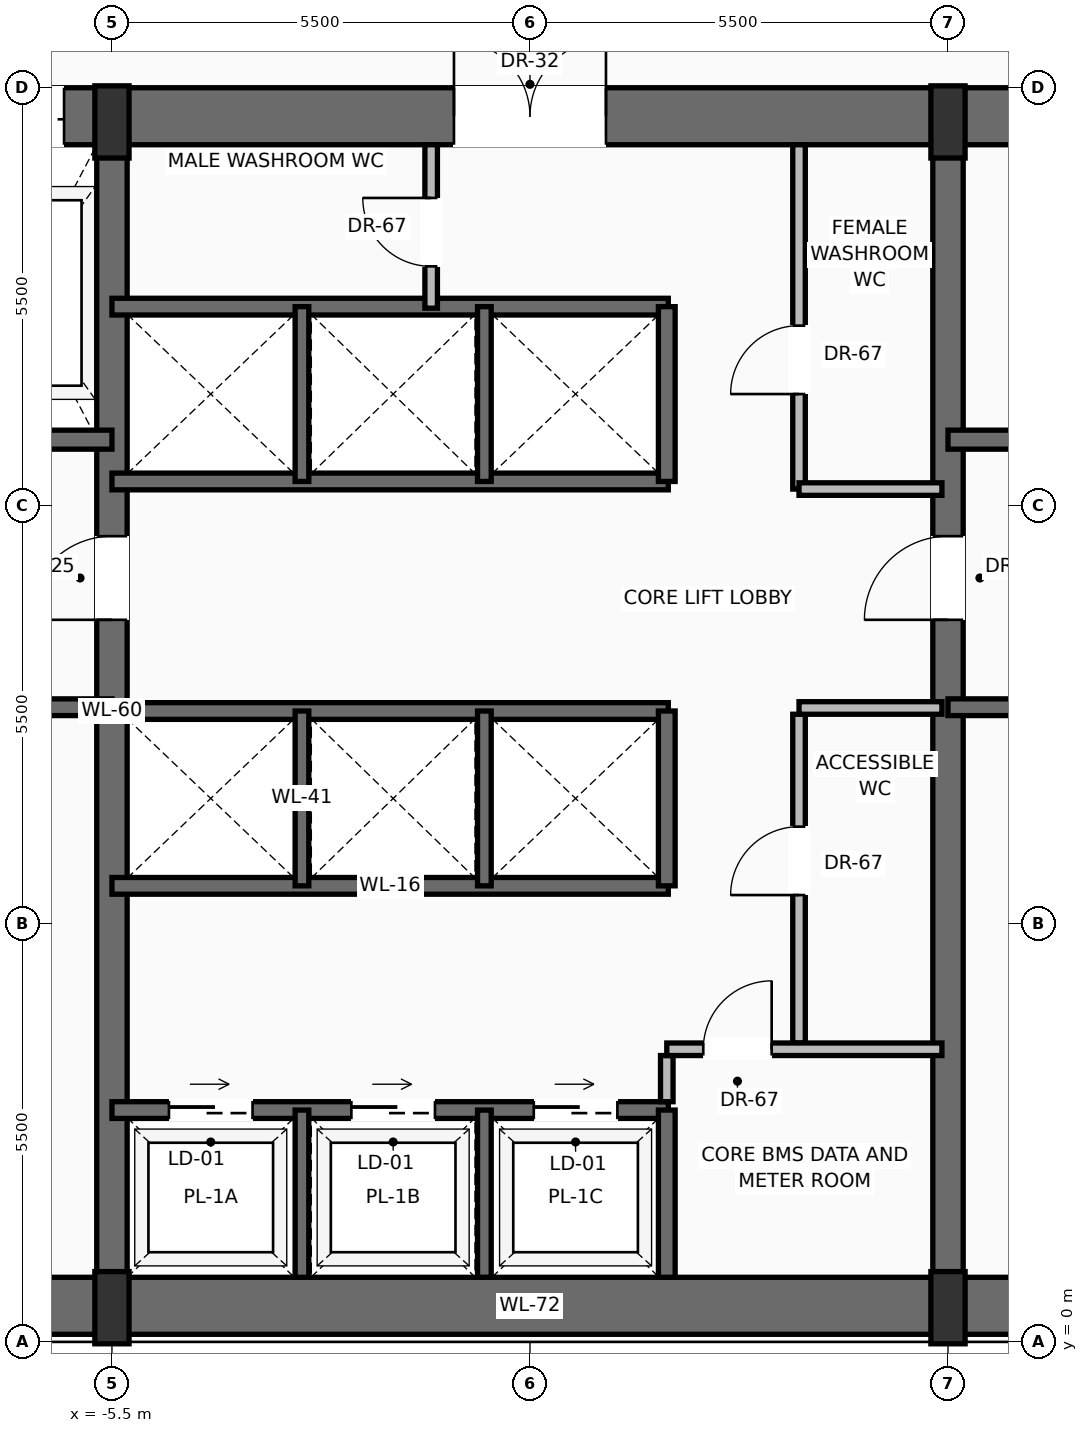
"""IFC4 building model, lengths in metres.
Left out: names, types, materials, properties, quantities, classifications, styles, units other than length and angle.
Written with IfcOpenShell. Run it as: python <this file> out.ifc"""

import sys

from ifc_helpers import new_model, si_unit, direction, frame, frame_2d, origin, origin_2d, place, context, subcontext, project, spatial, rectangle, extrude, source, transform, mapped, element, fill, save


model = new_model("IFC4")
c1 = context("Model", 3, precision=1e-05, world=origin(), true_north=direction((0.0, 1.0)))
c2 = subcontext(c1, "Body", "Model", "MODEL_VIEW")
j1 = project(units=[si_unit("LENGTHUNIT", "METRE"), si_unit("PLANEANGLEUNIT", "RADIAN")], contexts=[c1])
p1 = place(None, origin())
s1 = spatial("IfcSite", under=j1, at=p1, CompositionType="ELEMENT")
p2 = place(p1, origin())
s2 = spatial("IfcBuilding", under=s1, at=p2, CompositionType="ELEMENT")
p3 = place(p2, frame((0.0, 0.0, 102.5)))
s3 = spatial("IfcBuildingStorey", under=s2, at=p3, CompositionType="ELEMENT", Elevation=102.5)
p4 = place(p3, frame((-10.65, 0.475, 0.0), z_axis=(0.0, 0.0, 1.0), x_axis=(1.0, 0.0, 0.0)))
e1 = element("IfcWall", 1, at=p4, inside=s3, PredefinedType="SHEAR", context=c2, shape_type="SweptSolid", body=[
    extrude(rectangle(XDim=21.3, YDim=0.75, at=frame_2d((10.65, 0.0))), origin(), (0.0, 0.0, 1.0), 3.45),
])
p5 = place(p3, frame((-10.9, 16.125, 0.0), z_axis=(0.0, 0.0, 1.0), x_axis=(1.0, 0.0, 0.0)))
e2 = element("IfcWall", 2, at=p5, inside=s3, PredefinedType="SHEAR", context=c2, shape_type="SweptSolid", body=[
    extrude(rectangle(XDim=21.8, YDim=0.75, at=frame_2d((10.9, 0.0))), origin(), (0.0, 0.0, 1.0), 3.45),
])
p6 = place(p5, frame((3.47, 0.0, 0.0)))
e3 = element("IfcOpeningElement", 3, at=p6, cuts=e2, PredefinedType="OPENING", context=c2, shape_type="SweptSolid", body=[
    extrude(rectangle(XDim=1.3, YDim=2.3, at=frame_2d((0.65, 1.15))), frame((0.0, 0.385, 0.0), z_axis=(0.0, -1.0, 0.0), x_axis=(1.0, 0.0, 0.0)), (0.0, 0.0, 1.0), 0.77),
])
p7 = place(p5, frame((9.9, 0.0, 0.0)))
e4 = element("IfcOpeningElement", 4, at=p7, cuts=e2, PredefinedType="OPENING", context=c2, shape_type="SweptSolid", body=[
    extrude(rectangle(XDim=2.0, YDim=2.4, at=frame_2d((1.0, 1.2))), frame((0.0, 0.385, 0.0), z_axis=(0.0, -1.0, 0.0), x_axis=(1.0, 0.0, 0.0)), (0.0, 0.0, 1.0), 0.77),
])
p8 = place(p3, frame((-5.5, 0.475, 0.0), z_axis=(0.0, 0.0, 1.0), x_axis=(0.0, 1.0, 0.0)))
e5 = element("IfcWall", 5, at=p8, inside=s3, PredefinedType="SHEAR", context=c2, shape_type="SweptSolid", body=[
    extrude(rectangle(XDim=15.65, YDim=0.4, at=frame_2d((7.825, 0.0))), origin(), (0.0, 0.0, 1.0), 3.45),
])
p9 = place(p8, frame((9.025, 0.0, 0.0)))
e6 = element("IfcOpeningElement", 6, at=p9, cuts=e5, PredefinedType="OPENING", context=c2, shape_type="SweptSolid", body=[
    extrude(rectangle(XDim=1.1, YDim=2.2, at=frame_2d((0.55, 1.1))), frame((0.0, 0.21, 0.0), z_axis=(0.0, -1.0, 0.0), x_axis=(1.0, 0.0, 0.0)), (0.0, 0.0, 1.0), 0.42),
])
p10 = place(p3, frame((5.5, 0.475, 0.0), z_axis=(0.0, 0.0, 1.0), x_axis=(0.0, 1.0, 0.0)))
e7 = element("IfcWall", 7, at=p10, inside=s3, PredefinedType="SHEAR", context=c2, shape_type="SweptSolid", body=[
    extrude(rectangle(XDim=15.65, YDim=0.4, at=frame_2d((7.825, 0.0))), origin(), (0.0, 0.0, 1.0), 3.45),
])
p11 = place(p10, frame((9.025, 0.0, 0.0)))
e8 = element("IfcOpeningElement", 8, at=p11, cuts=e7, PredefinedType="OPENING", context=c2, shape_type="SweptSolid", body=[
    extrude(rectangle(XDim=1.1, YDim=2.2, at=frame_2d((0.55, 1.1))), frame((0.0, 0.21, 0.0), z_axis=(0.0, -1.0, 0.0), x_axis=(1.0, 0.0, 0.0)), (0.0, 0.0, 1.0), 0.42),
])
m1 = source(origin(), c2, "Body", "SweptSolid", [
    extrude(rectangle(XDim=0.45, YDim=0.95, at=origin_2d()), origin(), (0.0, 0.0, 1.0), 3.7),
])
for number, where, z_axis, x_axis in (
    (9, (-5.5, 0.45, 0.0), (0.0, 0.0, 1.0), (1.0, 0.0, 0.0)),
    (10, (5.5, 0.45, 0.0), (0.0, 0.0, 1.0), (1.0, 0.0, 0.0)),
    (11, (-5.5, 16.05, 0.0), (0.0, 0.0, 1.0), (1.0, 0.0, 0.0)),
    (12, (5.5, 16.05, 0.0), (0.0, 0.0, 1.0), (1.0, 0.0, 0.0)),
):
    element("IfcColumn", number, at=place(p3, frame(where, z_axis=z_axis, x_axis=x_axis)), inside=s3, PredefinedType="PILASTER", context=c2, shape_type="MappedRepresentation", body=[
        mapped(m1, transform((0.0, 0.0, 0.0), scale=1.0)),
    ])
p12 = place(p3, frame((-5.5, 8.35, 0.0), z_axis=(0.0, 0.0, 1.0), x_axis=(-1.0, 0.0, 0.0)))
e13 = element("IfcWall", 13, at=p12, inside=s3, PredefinedType="SOLIDWALL", context=c2, shape_type="SweptSolid", body=[
    extrude(rectangle(XDim=4.65, YDim=0.22, at=frame_2d((2.325, 0.0))), origin(), (0.0, 0.0, 1.0), 3.45),
])
p13 = place(p12, frame((2.5, 0.0, 0.0)))
e14 = element("IfcOpeningElement", 14, at=p13, cuts=e13, PredefinedType="OPENING", context=c2, shape_type="SweptSolid", body=[
    extrude(rectangle(XDim=1.15, YDim=2.2, at=frame_2d((0.575, 1.1))), frame((0.0, 0.12, 0.0), z_axis=(0.0, -1.0, 0.0), x_axis=(1.0, 0.0, 0.0)), (0.0, 0.0, 1.0), 0.24),
])
p14 = place(p3, frame((-5.5, 11.87, 0.0), z_axis=(0.0, 0.0, 1.0), x_axis=(-1.0, 0.0, 0.0)))
e15 = element("IfcWall", 15, at=p14, inside=s3, PredefinedType="SOLIDWALL", context=c2, shape_type="SweptSolid", body=[
    extrude(rectangle(XDim=4.65, YDim=0.25, at=frame_2d((2.325, 0.0))), origin(), (0.0, 0.0, 1.0), 3.45),
])
p15 = place(p14, frame((2.95, 0.0, 0.0)))
e16 = element("IfcOpeningElement", 16, at=p15, cuts=e15, PredefinedType="OPENING", context=c2, shape_type="SweptSolid", body=[
    extrude(rectangle(XDim=1.2, YDim=2.25, at=frame_2d((0.6, 1.125))), frame((0.0, 0.135, 0.0), z_axis=(0.0, -1.0, 0.0), x_axis=(1.0, 0.0, 0.0)), (0.0, 0.0, 1.0), 0.27),
])
p16 = place(p3, frame((10.15, 8.35, 0.0), z_axis=(0.0, 0.0, 1.0), x_axis=(-1.0, 0.0, 0.0)))
e17 = element("IfcWall", 17, at=p16, inside=s3, PredefinedType="SOLIDWALL", context=c2, shape_type="SweptSolid", body=[
    extrude(rectangle(XDim=4.65, YDim=0.22, at=frame_2d((2.325, 0.0))), origin(), (0.0, 0.0, 1.0), 3.45),
])
p17 = place(p16, frame((1.0, 0.0, 0.0)))
e18 = element("IfcOpeningElement", 18, at=p17, cuts=e17, PredefinedType="OPENING", context=c2, shape_type="SweptSolid", body=[
    extrude(rectangle(XDim=1.15, YDim=2.2, at=frame_2d((0.575, 1.1))), frame((0.0, 0.12, 0.0), z_axis=(0.0, -1.0, 0.0), x_axis=(1.0, 0.0, 0.0)), (0.0, 0.0, 1.0), 0.24),
])
p18 = place(p3, frame((10.15, 11.87, 0.0), z_axis=(0.0, 0.0, 1.0), x_axis=(-1.0, 0.0, 0.0)))
e19 = element("IfcWall", 19, at=p18, inside=s3, PredefinedType="SOLIDWALL", context=c2, shape_type="SweptSolid", body=[
    extrude(rectangle(XDim=4.65, YDim=0.25, at=frame_2d((2.325, 0.0))), origin(), (0.0, 0.0, 1.0), 3.45),
])
p19 = place(p18, frame((0.5, 0.0, 0.0)))
e20 = element("IfcOpeningElement", 20, at=p19, cuts=e19, PredefinedType="OPENING", context=c2, shape_type="SweptSolid", body=[
    extrude(rectangle(XDim=1.2, YDim=2.25, at=frame_2d((0.6, 1.125))), frame((0.0, 0.135, 0.0), z_axis=(0.0, -1.0, 0.0), x_axis=(1.0, 0.0, 0.0)), (0.0, 0.0, 1.0), 0.27),
])
p20 = place(p3, frame((-5.5, 3.05, 0.0), z_axis=(0.0, 0.0, 1.0), x_axis=(1.0, 0.0, 0.0)))
e21 = element("IfcWall", 21, at=p20, inside=s3, PredefinedType="SOLIDWALL", context=c2, shape_type="SweptSolid", body=[
    extrude(rectangle(XDim=7.32, YDim=0.22, at=frame_2d((3.66, 0.0))), origin(), (0.0, 0.0, 1.0), 3.45),
])
p21 = place(p20, frame((0.75, 0.0, 0.0)))
e22 = element("IfcOpeningElement", 22, at=p21, cuts=e21, PredefinedType="OPENING", context=c2, shape_type="SweptSolid", body=[
    extrude(rectangle(XDim=1.1, YDim=2.2, at=frame_2d((0.55, 1.1))), frame((0.0, 0.12, 0.0), z_axis=(0.0, -1.0, 0.0), x_axis=(1.0, 0.0, 0.0)), (0.0, 0.0, 1.0), 0.24),
])
p22 = place(p20, frame((3.15, 0.0, 0.0)))
e23 = element("IfcOpeningElement", 23, at=p22, cuts=e21, PredefinedType="OPENING", context=c2, shape_type="SweptSolid", body=[
    extrude(rectangle(XDim=1.1, YDim=2.2, at=frame_2d((0.55, 1.1))), frame((0.0, 0.12, 0.0), z_axis=(0.0, -1.0, 0.0), x_axis=(1.0, 0.0, 0.0)), (0.0, 0.0, 1.0), 0.24),
])
p23 = place(p20, frame((5.55, 0.0, 0.0)))
e24 = element("IfcOpeningElement", 24, at=p23, cuts=e21, PredefinedType="OPENING", context=c2, shape_type="SweptSolid", body=[
    extrude(rectangle(XDim=1.1, YDim=2.2, at=frame_2d((0.55, 1.1))), frame((0.0, 0.12, 0.0), z_axis=(0.0, -1.0, 0.0), x_axis=(1.0, 0.0, 0.0)), (0.0, 0.0, 1.0), 0.24),
])
p24 = place(p3, frame((1.8, 0.85, 0.0), z_axis=(0.0, 0.0, 1.0), x_axis=(0.0, 1.0, 0.0)))
e25 = element("IfcWall", 25, at=p24, inside=s3, PredefinedType="SOLIDWALL", context=c2, shape_type="SweptSolid", body=[
    extrude(rectangle(XDim=2.2, YDim=0.22, at=frame_2d((1.1, 0.0))), origin(), (0.0, 0.0, 1.0), 3.45),
])
for number, where, z_axis, x_axis in (
    (26, (-3.0, 0.85, 0.0), (0.0, 0.0, 1.0), (0.0, 1.0, 0.0)),
    (27, (-0.6, 0.85, 0.0), (0.0, 0.0, 1.0), (0.0, 1.0, 0.0)),
):
    element("IfcWall", number, at=place(p3, frame(where, z_axis=z_axis, x_axis=x_axis)), inside=s3, PredefinedType="SOLIDWALL", context=c2, shape_type="SweptSolid", body=[
        extrude(rectangle(XDim=2.2, YDim=0.18, at=frame_2d((1.1, 0.0))), origin(), (0.0, 0.0, 1.0), 3.45),
    ])
p25 = place(p3, frame((1.8, 3.16, 0.0), z_axis=(0.0, 0.0, 1.0), x_axis=(0.0, 1.0, 0.0)))
e28 = element("IfcWall", 28, at=p25, inside=s3, PredefinedType="PARTITIONING", context=c2, shape_type="SweptSolid", body=[
    extrude(rectangle(XDim=0.608, YDim=0.165, at=frame_2d((0.304, 0.0))), origin(), (0.0, 0.0, 1.0), 3.442),
])
p26 = place(p3, frame((3.54, 3.933, 0.0), z_axis=(0.0, 0.0, 1.0), x_axis=(0.0, 1.0, 0.0)))
e29 = element("IfcWall", 29, at=p26, inside=s3, PredefinedType="PARTITIONING", context=c2, shape_type="SweptSolid", body=[
    extrude(rectangle(XDim=4.325, YDim=0.165, at=frame_2d((2.163, 0.0))), origin(), (0.0, 0.0, 1.0), 3.442),
])
p27 = place(p26, frame((1.946, 0.0, 0.0)))
e30 = element("IfcOpeningElement", 30, at=p27, cuts=e29, PredefinedType="OPENING", context=c2, shape_type="SweptSolid", body=[
    extrude(rectangle(XDim=0.9, YDim=2.1, at=frame_2d((0.45, 1.05))), frame((0.0, 0.093, 0.0), z_axis=(0.0, -1.0, 0.0), x_axis=(1.0, 0.0, 0.0)), (0.0, 0.0, 1.0), 0.185),
])
p28 = place(p3, frame((3.54, 8.34, 0.0), z_axis=(0.0, 0.0, 1.0), x_axis=(1.0, 0.0, 0.0)))
e31 = element("IfcWall", 31, at=p28, inside=s3, PredefinedType="PARTITIONING", context=c2, shape_type="SweptSolid", body=[
    extrude(rectangle(XDim=1.88, YDim=0.165, at=frame_2d((0.94, 0.0))), origin(), (0.0, 0.0, 1.0), 3.442),
])
p29 = place(p3, frame((1.8, 3.85, 0.0), z_axis=(0.0, 0.0, 1.0), x_axis=(1.0, 0.0, 0.0)))
e32 = element("IfcWall", 32, at=p29, inside=s3, PredefinedType="PARTITIONING", context=c2, shape_type="SweptSolid", body=[
    extrude(rectangle(XDim=3.62, YDim=0.165, at=frame_2d((1.81, 0.0))), origin(), (0.0, 0.0, 1.0), 3.442),
])
p30 = place(p29, frame((0.48, 0.0, 0.0)))
e33 = element("IfcOpeningElement", 33, at=p30, cuts=e32, PredefinedType="OPENING", context=c2, shape_type="SweptSolid", body=[
    extrude(rectangle(XDim=0.9, YDim=2.1, at=frame_2d((0.45, 1.05))), frame((0.0, 0.093, 0.0), z_axis=(0.0, -1.0, 0.0), x_axis=(1.0, 0.0, 0.0)), (0.0, 0.0, 1.0), 0.185),
])
for number, where, z_axis, x_axis in (
    (34, (-5.5, 6.0, 0.0), (0.0, 0.0, 1.0), (1.0, 0.0, 0.0)),
    (35, (-5.5, 8.3, 0.0), (0.0, 0.0, 1.0), (1.0, 0.0, 0.0)),
):
    element("IfcWall", number, at=place(p3, frame(where, z_axis=z_axis, x_axis=x_axis)), inside=s3, PredefinedType="SOLIDWALL", context=c2, shape_type="SweptSolid", body=[
        extrude(rectangle(XDim=7.32, YDim=0.22, at=frame_2d((3.66, 0.0))), origin(), (0.0, 0.0, 1.0), 3.45),
    ])
p31 = place(p3, frame((1.8, 6.0, 0.0), z_axis=(0.0, 0.0, 1.0), x_axis=(0.0, 1.0, 0.0)))
e36 = element("IfcWall", 36, at=p31, inside=s3, PredefinedType="SOLIDWALL", context=c2, shape_type="SweptSolid", body=[
    extrude(rectangle(XDim=2.3, YDim=0.22, at=frame_2d((1.15, 0.0))), origin(), (0.0, 0.0, 1.0), 3.45),
])
for number, where, z_axis, x_axis in (
    (37, (-3.0, 6.0, 0.0), (0.0, 0.0, 1.0), (0.0, 1.0, 0.0)),
    (38, (-0.6, 6.0, 0.0), (0.0, 0.0, 1.0), (0.0, 1.0, 0.0)),
):
    element("IfcWall", number, at=place(p3, frame(where, z_axis=z_axis, x_axis=x_axis)), inside=s3, PredefinedType="SOLIDWALL", context=c2, shape_type="SweptSolid", body=[
        extrude(rectangle(XDim=2.3, YDim=0.18, at=frame_2d((1.15, 0.0))), origin(), (0.0, 0.0, 1.0), 3.45),
    ])
for number, where, z_axis, x_axis in (
    (39, (-5.5, 11.32, 0.0), (0.0, 0.0, 1.0), (1.0, 0.0, 0.0)),
    (40, (-5.5, 13.62, 0.0), (0.0, 0.0, 1.0), (1.0, 0.0, 0.0)),
):
    element("IfcWall", number, at=place(p3, frame(where, z_axis=z_axis, x_axis=x_axis)), inside=s3, PredefinedType="SOLIDWALL", context=c2, shape_type="SweptSolid", body=[
        extrude(rectangle(XDim=7.32, YDim=0.22, at=frame_2d((3.66, 0.0))), origin(), (0.0, 0.0, 1.0), 3.45),
    ])
p32 = place(p3, frame((1.8, 11.32, 0.0), z_axis=(0.0, 0.0, 1.0), x_axis=(0.0, 1.0, 0.0)))
e41 = element("IfcWall", 41, at=p32, inside=s3, PredefinedType="SOLIDWALL", context=c2, shape_type="SweptSolid", body=[
    extrude(rectangle(XDim=2.3, YDim=0.22, at=frame_2d((1.15, 0.0))), origin(), (0.0, 0.0, 1.0), 3.45),
])
for number, where, z_axis, x_axis in (
    (42, (-3.0, 11.32, 0.0), (0.0, 0.0, 1.0), (0.0, 1.0, 0.0)),
    (43, (-0.6, 11.32, 0.0), (0.0, 0.0, 1.0), (0.0, 1.0, 0.0)),
):
    element("IfcWall", number, at=place(p3, frame(where, z_axis=z_axis, x_axis=x_axis)), inside=s3, PredefinedType="SOLIDWALL", context=c2, shape_type="SweptSolid", body=[
        extrude(rectangle(XDim=2.3, YDim=0.18, at=frame_2d((1.15, 0.0))), origin(), (0.0, 0.0, 1.0), 3.45),
    ])
p33 = place(p3, frame((-1.3, 13.6, 0.0), z_axis=(0.0, 0.0, 1.0), x_axis=(0.0, 1.0, 0.0)))
e44 = element("IfcWall", 44, at=p33, inside=s3, PredefinedType="PARTITIONING", context=c2, shape_type="SweptSolid", body=[
    extrude(rectangle(XDim=2.15, YDim=0.165, at=frame_2d((1.075, 0.0))), origin(), (0.0, 0.0, 1.0), 3.442),
])
p34 = place(p33, frame((0.55, 0.0, 0.0)))
e45 = element("IfcOpeningElement", 45, at=p34, cuts=e44, PredefinedType="OPENING", context=c2, shape_type="SweptSolid", body=[
    extrude(rectangle(XDim=0.9, YDim=2.1, at=frame_2d((0.45, 1.05))), frame((0.0, 0.093, 0.0), z_axis=(0.0, -1.0, 0.0), x_axis=(1.0, 0.0, 0.0)), (0.0, 0.0, 1.0), 0.185),
])
p35 = place(p3, frame((3.54, 11.22, 0.0), z_axis=(0.0, 0.0, 1.0), x_axis=(0.0, 1.0, 0.0)))
e46 = element("IfcWall", 46, at=p35, inside=s3, PredefinedType="PARTITIONING", context=c2, shape_type="SweptSolid", body=[
    extrude(rectangle(XDim=4.53, YDim=0.165, at=frame_2d((2.265, 0.0))), origin(), (0.0, 0.0, 1.0), 3.442),
])
p36 = place(p35, frame((1.25, 0.0, 0.0)))
e47 = element("IfcOpeningElement", 47, at=p36, cuts=e46, PredefinedType="OPENING", context=c2, shape_type="SweptSolid", body=[
    extrude(rectangle(XDim=0.9, YDim=2.1, at=frame_2d((0.45, 1.05))), frame((0.0, 0.093, 0.0), z_axis=(0.0, -1.0, 0.0), x_axis=(1.0, 0.0, 0.0)), (0.0, 0.0, 1.0), 0.185),
])
p37 = place(p3, frame((3.54, 11.22, 0.0), z_axis=(0.0, 0.0, 1.0), x_axis=(1.0, 0.0, 0.0)))
e48 = element("IfcWall", 48, at=p37, inside=s3, PredefinedType="PARTITIONING", context=c2, shape_type="SweptSolid", body=[
    extrude(rectangle(XDim=1.88, YDim=0.165, at=frame_2d((0.94, 0.0))), origin(), (0.0, 0.0, 1.0), 3.442),
])
m2 = source(origin(), c2, "Body", "SweptSolid", [
    extrude(rectangle(XDim=1.1, YDim=2.2, at=frame_2d((0.55, 1.1))), frame((0.0, 0.025, 0.0), z_axis=(0.0, -1.0, 0.0), x_axis=(1.0, 0.0, 0.0)), (0.0, 0.0, 1.0), 0.05),
])
p38 = place(p9, origin())
e49 = element("IfcDoor", 49, at=p38, inside=s3, OperationType="SINGLE_SWING_LEFT", PredefinedType="DOOR", context=c2, shape_type="MappedRepresentation", body=[
    mapped(m2, transform((0.0, 0.0, 0.0), scale=1.0)),
])
fill(e6, e49)
m3 = source(origin(), c2, "Body", "SweptSolid", [
    extrude(rectangle(XDim=1.3, YDim=2.3, at=frame_2d((0.65, 1.15))), frame((0.0, 0.025, 0.0), z_axis=(0.0, -1.0, 0.0), x_axis=(1.0, 0.0, 0.0)), (0.0, 0.0, 1.0), 0.05),
])
p39 = place(p6, origin())
e50 = element("IfcDoor", 50, at=p39, inside=s3, OperationType="SLIDING_TO_RIGHT", PredefinedType="DOOR", context=c2, shape_type="MappedRepresentation", body=[
    mapped(m3, transform((0.0, 0.0, 0.0), scale=1.0)),
])
fill(e3, e50)
p40 = place(p11, origin())
e51 = element("IfcDoor", 51, at=p40, inside=s3, OperationType="SINGLE_SWING_LEFT", PredefinedType="DOOR", context=c2, shape_type="MappedRepresentation", body=[
    mapped(m2, transform((0.0, 0.0, 0.0), scale=1.0)),
])
fill(e8, e51)
m4 = source(origin(), c2, "Body", "SweptSolid", [
    extrude(rectangle(XDim=2.0, YDim=2.4, at=frame_2d((1.0, 1.2))), frame((0.0, 0.025, 0.0), z_axis=(0.0, -1.0, 0.0), x_axis=(1.0, 0.0, 0.0)), (0.0, 0.0, 1.0), 0.05),
])
p41 = place(p7, origin())
e52 = element("IfcDoor", 52, at=p41, inside=s3, OperationType="DOUBLE_DOOR_SINGLE_SWING", PredefinedType="DOOR", context=c2, shape_type="MappedRepresentation", body=[
    mapped(m4, transform((0.0, 0.0, 0.0), scale=1.0)),
])
fill(e4, e52)
m5 = source(origin(), c2, "Body", "SweptSolid", [
    extrude(rectangle(XDim=1.1, YDim=2.2, at=frame_2d((0.55, 1.1))), frame((0.0, 0.025, 0.0), z_axis=(0.0, -1.0, 0.0), x_axis=(1.0, 0.0, 0.0)), (0.0, 0.0, 1.0), 0.05),
])
p42 = place(p21, origin())
e53 = element("IfcDoor", 53, at=p42, inside=s3, OperationType="SLIDING_TO_RIGHT", PredefinedType="DOOR", context=c2, shape_type="MappedRepresentation", body=[
    mapped(m5, transform((0.0, 0.0, 0.0), scale=1.0)),
])
fill(e22, e53)
p43 = place(p22, origin())
e54 = element("IfcDoor", 54, at=p43, inside=s3, OperationType="SLIDING_TO_RIGHT", PredefinedType="DOOR", context=c2, shape_type="MappedRepresentation", body=[
    mapped(m5, transform((0.0, 0.0, 0.0), scale=1.0)),
])
fill(e23, e54)
p44 = place(p23, origin())
e55 = element("IfcDoor", 55, at=p44, inside=s3, OperationType="SLIDING_TO_RIGHT", PredefinedType="DOOR", context=c2, shape_type="MappedRepresentation", body=[
    mapped(m5, transform((0.0, 0.0, 0.0), scale=1.0)),
])
fill(e24, e55)
m6 = source(origin(), c2, "Body", "SweptSolid", [
    extrude(rectangle(XDim=0.9, YDim=2.1, at=frame_2d((0.45, 1.05))), frame((0.0, 0.025, 0.0), z_axis=(0.0, -1.0, 0.0), x_axis=(1.0, 0.0, 0.0)), (0.0, 0.0, 1.0), 0.05),
])
p45 = place(p30, origin())
e56 = element("IfcDoor", 56, at=p45, inside=s3, OperationType="SINGLE_SWING_RIGHT", PredefinedType="DOOR", context=c2, shape_type="MappedRepresentation", body=[
    mapped(m6, transform((0.0, 0.0, 0.0), scale=1.0)),
])
fill(e33, e56)
p46 = place(p27, origin())
e57 = element("IfcDoor", 57, at=p46, inside=s3, OperationType="SINGLE_SWING_LEFT", PredefinedType="DOOR", context=c2, shape_type="MappedRepresentation", body=[
    mapped(m6, transform((0.0, 0.0, 0.0), scale=1.0)),
])
fill(e30, e57)
p47 = place(p34, origin())
e58 = element("IfcDoor", 58, at=p47, inside=s3, OperationType="SINGLE_SWING_RIGHT", PredefinedType="DOOR", context=c2, shape_type="MappedRepresentation", body=[
    mapped(m6, transform((0.0, 0.0, 0.0), scale=1.0)),
])
fill(e45, e58)
p48 = place(p36, origin())
e59 = element("IfcDoor", 59, at=p48, inside=s3, OperationType="SINGLE_SWING_LEFT", PredefinedType="DOOR", context=c2, shape_type="MappedRepresentation", body=[
    mapped(m6, transform((0.0, 0.0, 0.0), scale=1.0)),
])
fill(e47, e59)
save(model, sys.argv[1])
